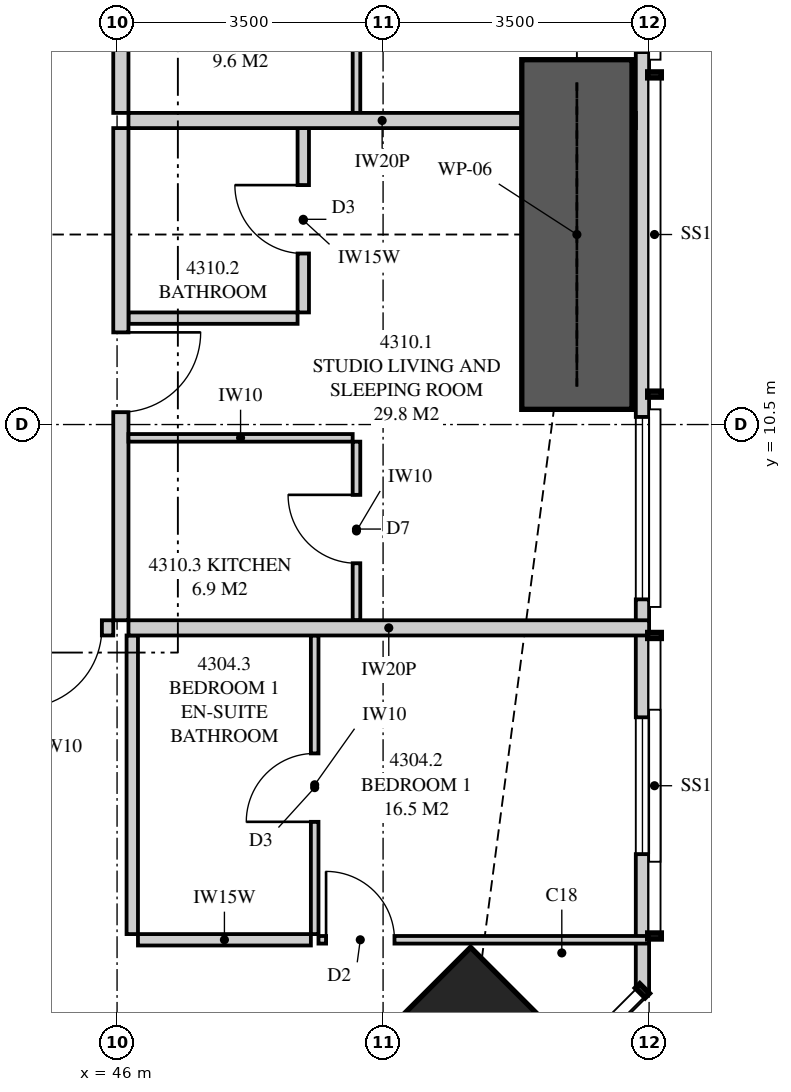
"""IFC4 building model, lengths in metres.
Left out: names, types, materials, properties, quantities, classifications, styles, units other than length and angle.
Written with IfcOpenShell. Run it as: python <this file> out.ifc"""

import sys

from ifc_helpers import new_model, si_unit, direction, frame, frame_2d, origin, origin_2d, place, context, subcontext, project, spatial, polyline, rectangle, outline, extrude, element, fill, save


model = new_model("IFC4")
c1 = context("Model", 3, precision=1e-05, world=origin(), true_north=direction((0.0, 1.0)))
c2 = subcontext(c1, "Body", "Model", "MODEL_VIEW")
j1 = project(units=[si_unit("LENGTHUNIT", "METRE"), si_unit("PLANEANGLEUNIT", "RADIAN")], contexts=[c1])
p1 = place(None, origin())
s1 = spatial("IfcSite", under=j1, at=p1, CompositionType="ELEMENT")
p2 = place(p1, origin())
s2 = spatial("IfcBuilding", under=s1, at=p2, CompositionType="ELEMENT")
p3 = place(p2, frame((0.0, 0.0, 161.05)))
s3 = spatial("IfcBuildingStorey", under=s2, at=p3, CompositionType="ELEMENT", Elevation=161.05)
p4 = place(p3, frame((50.652, 2.348, 0.0), z_axis=(0.0, 0.0, 1.0), x_axis=(0.707106781187, 0.707106781187, 0.0)))
e1 = element("IfcColumn", 1, at=p4, inside=s3, PredefinedType="COLUMN", context=c2, shape_type="SweptSolid", body=[
    extrude(rectangle(XDim=1.8, YDim=1.8, at=origin_2d()), origin(), (0.0, 0.0, 1.0), 3.35),
])
p5 = place(p3, frame((52.913, 3.051, 0.0), z_axis=(0.0, 0.0, 1.0), x_axis=(0.0, 1.0, 0.0)))
e2 = element("IfcWall", 2, at=p5, inside=s3, PredefinedType="SOLIDWALL", context=c2, shape_type="SweptSolid", body=[
    extrude(outline(polyline([(0.0, 0.0), (29.897, 0.0), (29.897, 3.11), (22.167, 3.11), (22.167, 2.15), (22.074, 2.15), (22.074, 3.11), (21.949, 3.11), (21.949, 2.15), (9.949, 2.15), (9.949, 3.11), (9.847, 3.11), (9.847, 2.15), (9.706, 2.15), (9.706, 3.11), (0.0, 3.11), (0.0, 0.0)])), frame((0.0, 0.087, 0.0), z_axis=(0.0, -1.0, 0.0), x_axis=(1.0, 0.0, 0.0)), (0.0, 0.0, 1.0), 0.175),
])
p6 = place(p5, frame((1.797, 0.0, 0.4)))
e3 = element("IfcOpeningElement", 3, at=p6, cuts=e2, PredefinedType="OPENING", context=c2, shape_type="SweptSolid", body=[
    extrude(rectangle(XDim=1.8, YDim=1.7, at=frame_2d((0.9, 0.85))), frame((0.0, 0.097, 0.0), z_axis=(0.0, -1.0, 0.0), x_axis=(1.0, 0.0, 0.0)), (0.0, 0.0, 1.0), 0.195),
])
p7 = place(p5, frame((5.149, 0.0, 0.4)))
e4 = element("IfcOpeningElement", 4, at=p7, cuts=e2, PredefinedType="OPENING", context=c2, shape_type="SweptSolid", body=[
    extrude(rectangle(XDim=2.4, YDim=1.7, at=frame_2d((1.2, 0.85))), frame((0.0, 0.097, 0.0), z_axis=(0.0, -1.0, 0.0), x_axis=(1.0, 0.0, 0.0)), (0.0, 0.0, 1.0), 0.195),
])
p8 = place(p5, frame((15.274, 0.0, 0.0)))
e5 = element("IfcOpeningElement", 5, at=p8, cuts=e2, PredefinedType="OPENING", context=c2, shape_type="SweptSolid", body=[
    extrude(rectangle(XDim=1.8, YDim=2.1, at=frame_2d((0.9, 1.05))), frame((0.0, 0.097, 0.0), z_axis=(0.0, -1.0, 0.0), x_axis=(1.0, 0.0, 0.0)), (0.0, 0.0, 1.0), 0.195),
])
p9 = place(p5, frame((12.349, 0.0, 0.4)))
e6 = element("IfcOpeningElement", 6, at=p9, cuts=e2, PredefinedType="OPENING", context=c2, shape_type="SweptSolid", body=[
    extrude(rectangle(XDim=2.4, YDim=1.7, at=frame_2d((1.2, 0.85))), frame((0.0, 0.097, 0.0), z_axis=(0.0, -1.0, 0.0), x_axis=(1.0, 0.0, 0.0)), (0.0, 0.0, 1.0), 0.195),
])
p10 = place(p5, frame((24.373, 0.0, 0.4)))
e7 = element("IfcOpeningElement", 7, at=p10, cuts=e2, PredefinedType="OPENING", context=c2, shape_type="SweptSolid", body=[
    extrude(rectangle(XDim=1.2, YDim=1.7, at=frame_2d((0.6, 0.85))), frame((0.0, 0.097, 0.0), z_axis=(0.0, -1.0, 0.0), x_axis=(1.0, 0.0, 0.0)), (0.0, 0.0, 1.0), 0.195),
])
p11 = place(p5, frame((26.801, 0.0, 0.4)))
e8 = element("IfcOpeningElement", 8, at=p11, cuts=e2, PredefinedType="OPENING", context=c2, shape_type="SweptSolid", body=[
    extrude(rectangle(XDim=1.8, YDim=1.7, at=frame_2d((0.9, 0.85))), frame((0.0, 0.097, 0.0), z_axis=(0.0, -1.0, 0.0), x_axis=(1.0, 0.0, 0.0)), (0.0, 0.0, 1.0), 0.195),
])
p12 = place(p3, frame((41.2, 7.825, 0.0), z_axis=(0.0, 0.0, 1.0), x_axis=(1.0, 0.0, 0.0)))
e9 = element("IfcWall", 9, at=p12, inside=s3, PredefinedType="PARTITIONING", context=c2, shape_type="SweptSolid", body=[
    extrude(outline(polyline([(0.0, 0.0), (4.75, 0.0), (4.75, 3.11), (1.887, 3.11), (1.887, 2.541), (1.213, 2.541), (1.213, 3.11), (0.0, 3.11), (0.0, 0.0)])), frame((0.0, 0.1, 0.0), z_axis=(0.0, -1.0, 0.0), x_axis=(1.0, 0.0, 0.0)), (0.0, 0.0, 1.0), 0.2),
])
p13 = place(p12, frame((3.55, 0.0, 0.0)))
e10 = element("IfcOpeningElement", 10, at=p13, cuts=e9, PredefinedType="OPENING", context=c2, shape_type="SweptSolid", body=[
    extrude(rectangle(XDim=1.05, YDim=2.2, at=frame_2d((0.525, 1.1))), frame((0.0, 0.11, 0.0), z_axis=(0.0, -1.0, 0.0), x_axis=(1.0, 0.0, 0.0)), (0.0, 0.0, 1.0), 0.22),
])
p14 = place(p3, frame((48.6, 3.796, 0.0), z_axis=(0.0, 0.0, 1.0), x_axis=(0.0, 1.0, 0.0)))
e11 = element("IfcWall", 11, at=p14, inside=s3, PredefinedType="PARTITIONING", context=c2, shape_type="SweptSolid", body=[
    extrude(rectangle(XDim=3.929, YDim=0.1, at=frame_2d((1.964, 0.0))), origin(), (0.0, 0.0, 1.0), 3.11),
])
p15 = place(p14, frame((1.477, 0.0, 0.0)))
e12 = element("IfcOpeningElement", 12, at=p15, cuts=e11, PredefinedType="OPENING", context=c2, shape_type="SweptSolid", body=[
    extrude(rectangle(XDim=0.9, YDim=2.1, at=frame_2d((0.45, 1.05))), frame((0.0, 0.06, 0.0), z_axis=(0.0, -1.0, 0.0), x_axis=(1.0, 0.0, 0.0)), (0.0, 0.0, 1.0), 0.12),
])
p16 = place(p3, frame((48.65, 3.721, 0.0), z_axis=(0.0, 0.0, 1.0), x_axis=(1.0, 0.0, 0.0)))
e13 = element("IfcWall", 13, at=p16, inside=s3, PredefinedType="PARTITIONING", context=c2, shape_type="SweptSolid", body=[
    extrude(outline(polyline([(0.0, 0.0), (4.35, 0.0), (4.35, 3.11), (3.049, 3.11), (3.049, 2.15), (1.314, 2.15), (1.314, 3.11), (0.0, 3.11), (0.0, 0.0)])), frame((0.0, 0.05, 0.0), z_axis=(0.0, -1.0, 0.0), x_axis=(1.0, 0.0, 0.0)), (0.0, 0.0, 1.0), 0.1),
])
p17 = place(p16, frame((0.1, 0.0, 0.0)))
e14 = element("IfcOpeningElement", 14, at=p17, cuts=e13, PredefinedType="OPENING", context=c2, shape_type="SweptSolid", body=[
    extrude(rectangle(XDim=0.9, YDim=2.1, at=frame_2d((0.45, 1.05))), frame((0.0, 0.06, 0.0), z_axis=(0.0, -1.0, 0.0), x_axis=(1.0, 0.0, 0.0)), (0.0, 0.0, 1.0), 0.12),
])
p18 = place(p3, frame((46.275, 3.721, 0.0), z_axis=(0.0, 0.0, 1.0), x_axis=(1.0, 0.0, 0.0)))
e15 = element("IfcWall", 15, at=p18, inside=s3, PredefinedType="PLUMBINGWALL", context=c2, shape_type="SweptSolid", body=[
    extrude(rectangle(XDim=2.275, YDim=0.15, at=frame_2d((1.138, 0.0))), origin(), (0.0, 0.0, 1.0), 3.11),
])
p19 = place(p3, frame((46.2, 3.796, 0.0), z_axis=(0.0, 0.0, 1.0), x_axis=(0.0, 1.0, 0.0)))
e16 = element("IfcWall", 16, at=p19, inside=s3, PredefinedType="PLUMBINGWALL", context=c2, shape_type="SweptSolid", body=[
    extrude(rectangle(XDim=3.929, YDim=0.15, at=frame_2d((1.964, 0.0))), origin(), (0.0, 0.0, 1.0), 3.11),
])
p20 = place(p3, frame((46.15, 7.825, 0.0), z_axis=(0.0, 0.0, 1.0), x_axis=(1.0, 0.0, 0.0)))
e17 = element("IfcWall", 17, at=p20, inside=s3, PredefinedType="PARTITIONING", context=c2, shape_type="SweptSolid", body=[
    extrude(outline(polyline([(0.0, 0.0), (6.85, 0.0), (6.85, 3.11), (6.138, 3.11), (6.138, 2.15), (4.303, 2.15), (4.303, 3.11), (0.0, 3.11), (0.0, 0.0)])), frame((0.0, 0.1, 0.0), z_axis=(0.0, -1.0, 0.0), x_axis=(1.0, 0.0, 0.0)), (0.0, 0.0, 1.0), 0.2),
])
p21 = place(p3, frame((52.825, 14.5, 0.0), z_axis=(0.0, 0.0, 1.0), x_axis=(-1.0, 0.0, 0.0)))
e18 = element("IfcWall", 18, at=p21, inside=s3, PredefinedType="PARTITIONING", context=c2, shape_type="SweptSolid", body=[
    extrude(outline(polyline([(0.529, 2.15), (0.0, 2.15), (0.0, 0.0), (0.529, 0.0), (0.529, 0.29), (1.021, 0.29), (1.021, 0.0), (6.675, 0.0), (6.675, 3.11), (1.685, 3.11), (1.685, 2.15), (1.021, 2.15), (1.021, 1.86), (0.529, 1.86), (0.529, 2.15)])), frame((0.0, 0.1, 0.0), z_axis=(0.0, -1.0, 0.0), x_axis=(1.0, 0.0, 0.0)), (0.0, 0.0, 1.0), 0.2),
])
p22 = place(p3, frame((46.05, 7.925, 0.0), z_axis=(0.0, 0.0, 1.0), x_axis=(0.0, 1.0, 0.0)))
e19 = element("IfcWall", 19, at=p22, inside=s3, PredefinedType="PARTITIONING", context=c2, shape_type="SweptSolid", body=[
    extrude(outline(polyline([(0.0, 0.0), (6.475, 0.0), (6.475, 3.11), (5.412, 3.11), (5.412, 2.541), (4.738, 2.541), (4.738, 3.11), (0.0, 3.11), (0.0, 0.0)])), frame((0.0, 0.1, 0.0), z_axis=(0.0, -1.0, 0.0), x_axis=(1.0, 0.0, 0.0)), (0.0, 0.0, 1.0), 0.2),
])
p23 = place(p22, frame((2.738, 0.0, 0.0)))
e20 = element("IfcOpeningElement", 20, at=p23, cuts=e19, PredefinedType="OPENING", context=c2, shape_type="SweptSolid", body=[
    extrude(rectangle(XDim=1.05, YDim=2.2, at=frame_2d((0.525, 1.1))), frame((0.0, 0.11, 0.0), z_axis=(0.0, -1.0, 0.0), x_axis=(1.0, 0.0, 0.0)), (0.0, 0.0, 1.0), 0.22),
])
p24 = place(p3, frame((48.45, 11.975, 0.0), z_axis=(0.0, 0.0, 1.0), x_axis=(0.0, 1.0, 0.0)))
e21 = element("IfcWall", 21, at=p24, inside=s3, PredefinedType="PLUMBINGWALL", context=c2, shape_type="SweptSolid", body=[
    extrude(outline(polyline([(0.0, 0.0), (2.425, 0.0), (2.425, 3.11), (1.337, 3.11), (1.337, 2.541), (0.713, 2.541), (0.713, 3.11), (0.0, 3.11), (0.0, 0.0)])), frame((0.0, 0.075, 0.0), z_axis=(0.0, -1.0, 0.0), x_axis=(1.0, 0.0, 0.0)), (0.0, 0.0, 1.0), 0.15),
])
p25 = place(p24, frame((0.775, 0.0, 0.0)))
e22 = element("IfcOpeningElement", 22, at=p25, cuts=e21, PredefinedType="OPENING", context=c2, shape_type="SweptSolid", body=[
    extrude(rectangle(XDim=0.9, YDim=2.1, at=frame_2d((0.45, 1.05))), frame((0.0, 0.085, 0.0), z_axis=(0.0, -1.0, 0.0), x_axis=(1.0, 0.0, 0.0)), (0.0, 0.0, 1.0), 0.17),
])
p26 = place(p3, frame((48.375, 11.9, 0.0), z_axis=(0.0, 0.0, 1.0), x_axis=(-1.0, 0.0, 0.0)))
e23 = element("IfcWall", 23, at=p26, inside=s3, PredefinedType="PLUMBINGWALL", context=c2, shape_type="SweptSolid", body=[
    extrude(rectangle(XDim=2.225, YDim=0.15, at=frame_2d((1.113, 0.0))), origin(), (0.0, 0.0, 1.0), 3.11),
])
p27 = place(p3, frame((49.15, 7.925, 0.0), z_axis=(0.0, 0.0, 1.0), x_axis=(0.0, 1.0, 0.0)))
e24 = element("IfcWall", 24, at=p27, inside=s3, PredefinedType="PARTITIONING", context=c2, shape_type="SweptSolid", body=[
    extrude(rectangle(XDim=2.35, YDim=0.1, at=frame_2d((1.175, 0.0))), origin(), (0.0, 0.0, 1.0), 3.11),
])
p28 = place(p27, frame((0.75, 0.0, 0.0)))
e25 = element("IfcOpeningElement", 25, at=p28, cuts=e24, PredefinedType="OPENING", context=c2, shape_type="SweptSolid", body=[
    extrude(rectangle(XDim=0.9, YDim=2.1, at=frame_2d((0.45, 1.05))), frame((0.0, 0.06, 0.0), z_axis=(0.0, -1.0, 0.0), x_axis=(1.0, 0.0, 0.0)), (0.0, 0.0, 1.0), 0.12),
])
p29 = place(p3, frame((49.1, 10.325, 0.0), z_axis=(0.0, 0.0, 1.0), x_axis=(-1.0, 0.0, 0.0)))
e26 = element("IfcWall", 26, at=p29, inside=s3, PredefinedType="PARTITIONING", context=c2, shape_type="SweptSolid", body=[
    extrude(rectangle(XDim=2.95, YDim=0.1, at=frame_2d((1.475, 0.0))), origin(), (0.0, 0.0, 1.0), 3.11),
])
p30 = place(p3, frame((46.05, 14.6, 0.0), z_axis=(0.0, 0.0, 1.0), x_axis=(0.0, 1.0, 0.0)))
e27 = element("IfcWall", 27, at=p30, inside=s3, PredefinedType="PARTITIONING", context=c2, shape_type="SweptSolid", body=[
    extrude(rectangle(XDim=8.1, YDim=0.2, at=frame_2d((4.05, 0.0))), origin(), (0.0, 0.0, 1.0), 3.11),
])
p31 = place(p30, frame((3.55, 0.0, 0.0)))
e28 = element("IfcOpeningElement", 28, at=p31, cuts=e27, PredefinedType="OPENING", context=c2, shape_type="SweptSolid", body=[
    extrude(rectangle(XDim=1.05, YDim=2.2, at=frame_2d((0.525, 1.1))), frame((0.0, 0.11, 0.0), z_axis=(0.0, -1.0, 0.0), x_axis=(1.0, 0.0, 0.0)), (0.0, 0.0, 1.0), 0.22),
])
p32 = place(p3, frame((49.15, 14.6, 0.0), z_axis=(0.0, 0.0, 1.0), x_axis=(0.0, 1.0, 0.0)))
e29 = element("IfcWall", 29, at=p32, inside=s3, PredefinedType="PARTITIONING", context=c2, shape_type="SweptSolid", body=[
    extrude(rectangle(XDim=3.25, YDim=0.1, at=frame_2d((1.625, 0.0))), origin(), (0.0, 0.0, 1.0), 3.11),
])
p33 = place(p32, frame((1.2, 0.0, 0.0)))
e30 = element("IfcOpeningElement", 30, at=p33, cuts=e29, PredefinedType="OPENING", context=c2, shape_type="SweptSolid", body=[
    extrude(rectangle(XDim=0.9, YDim=2.1, at=frame_2d((0.45, 1.05))), frame((0.0, 0.06, 0.0), z_axis=(0.0, -1.0, 0.0), x_axis=(1.0, 0.0, 0.0)), (0.0, 0.0, 1.0), 0.12),
])
p34 = place(p3, frame((52.05, 10.7, 0.0), z_axis=(0.0, 0.0, 1.0), x_axis=(0.0, 1.0, 0.0)))
e31 = element("IfcWall", 31, at=p34, inside=s3, PredefinedType="SHEAR", context=c2, shape_type="SweptSolid", body=[
    extrude(rectangle(XDim=4.6, YDim=1.45, at=frame_2d((2.3, 0.0))), origin(), (0.0, 0.0, 1.0), 3.35),
])
p35 = place(p6, origin())
e32 = element("IfcWindow", 32, at=p35, inside=s3, PartitioningType="SINGLE_PANEL", PredefinedType="WINDOW", context=c2, shape_type="SweptSolid", body=[
    extrude(rectangle(XDim=1.8, YDim=1.7, at=frame_2d((0.9, 0.85))), frame((0.0, 0.03, 0.0), z_axis=(0.0, -1.0, 0.0), x_axis=(1.0, 0.0, 0.0)), (0.0, 0.0, 1.0), 0.06),
])
fill(e3, e32)
p36 = place(p7, origin())
e33 = element("IfcWindow", 33, at=p36, inside=s3, PartitioningType="SINGLE_PANEL", PredefinedType="WINDOW", context=c2, shape_type="SweptSolid", body=[
    extrude(rectangle(XDim=2.4, YDim=1.7, at=frame_2d((1.2, 0.85))), frame((0.0, 0.03, 0.0), z_axis=(0.0, -1.0, 0.0), x_axis=(1.0, 0.0, 0.0)), (0.0, 0.0, 1.0), 0.06),
])
fill(e4, e33)
p37 = place(p13, frame((1.05, 0.0, 0.0), z_axis=(0.0, 0.0, 1.0), x_axis=(-1.0, 0.0, 0.0)))
e34 = element("IfcDoor", 34, at=p37, inside=s3, OperationType="SINGLE_SWING_RIGHT", PredefinedType="DOOR", context=c2, shape_type="SweptSolid", body=[
    extrude(rectangle(XDim=1.05, YDim=2.2, at=frame_2d((0.525, 1.1))), frame((0.0, 0.025, 0.0), z_axis=(0.0, -1.0, 0.0), x_axis=(1.0, 0.0, 0.0)), (0.0, 0.0, 1.0), 0.05),
])
fill(e10, e34)
p38 = place(p17, origin())
e35 = element("IfcDoor", 35, at=p38, inside=s3, OperationType="SINGLE_SWING_LEFT", PredefinedType="DOOR", context=c2, shape_type="SweptSolid", body=[
    extrude(rectangle(XDim=0.9, YDim=2.1, at=frame_2d((0.45, 1.05))), frame((0.0, 0.025, 0.0), z_axis=(0.0, -1.0, 0.0), x_axis=(1.0, 0.0, 0.0)), (0.0, 0.0, 1.0), 0.05),
])
fill(e14, e35)
p39 = place(p15, origin())
e36 = element("IfcDoor", 36, at=p39, inside=s3, OperationType="SINGLE_SWING_LEFT", PredefinedType="DOOR", context=c2, shape_type="SweptSolid", body=[
    extrude(rectangle(XDim=0.9, YDim=2.1, at=frame_2d((0.45, 1.05))), frame((0.0, 0.025, 0.0), z_axis=(0.0, -1.0, 0.0), x_axis=(1.0, 0.0, 0.0)), (0.0, 0.0, 1.0), 0.05),
])
fill(e12, e36)
p40 = place(p23, frame((1.05, 0.0, 0.0), z_axis=(0.0, 0.0, 1.0), x_axis=(-1.0, 0.0, 0.0)))
e37 = element("IfcDoor", 37, at=p40, inside=s3, OperationType="SINGLE_SWING_LEFT", PredefinedType="DOOR", context=c2, shape_type="SweptSolid", body=[
    extrude(rectangle(XDim=1.05, YDim=2.2, at=frame_2d((0.525, 1.1))), frame((0.0, 0.025, 0.0), z_axis=(0.0, -1.0, 0.0), x_axis=(1.0, 0.0, 0.0)), (0.0, 0.0, 1.0), 0.05),
])
fill(e20, e37)
p41 = place(p25, origin())
e38 = element("IfcDoor", 38, at=p41, inside=s3, OperationType="SINGLE_SWING_RIGHT", PredefinedType="DOOR", context=c2, shape_type="SweptSolid", body=[
    extrude(rectangle(XDim=0.9, YDim=2.1, at=frame_2d((0.45, 1.05))), frame((0.0, 0.025, 0.0), z_axis=(0.0, -1.0, 0.0), x_axis=(1.0, 0.0, 0.0)), (0.0, 0.0, 1.0), 0.05),
])
fill(e22, e38)
p42 = place(p28, origin())
e39 = element("IfcDoor", 39, at=p42, inside=s3, OperationType="SINGLE_SWING_RIGHT", PredefinedType="DOOR", context=c2, shape_type="SweptSolid", body=[
    extrude(rectangle(XDim=0.9, YDim=2.1, at=frame_2d((0.45, 1.05))), frame((0.0, 0.025, 0.0), z_axis=(0.0, -1.0, 0.0), x_axis=(1.0, 0.0, 0.0)), (0.0, 0.0, 1.0), 0.05),
])
fill(e25, e39)
save(model, sys.argv[1])
